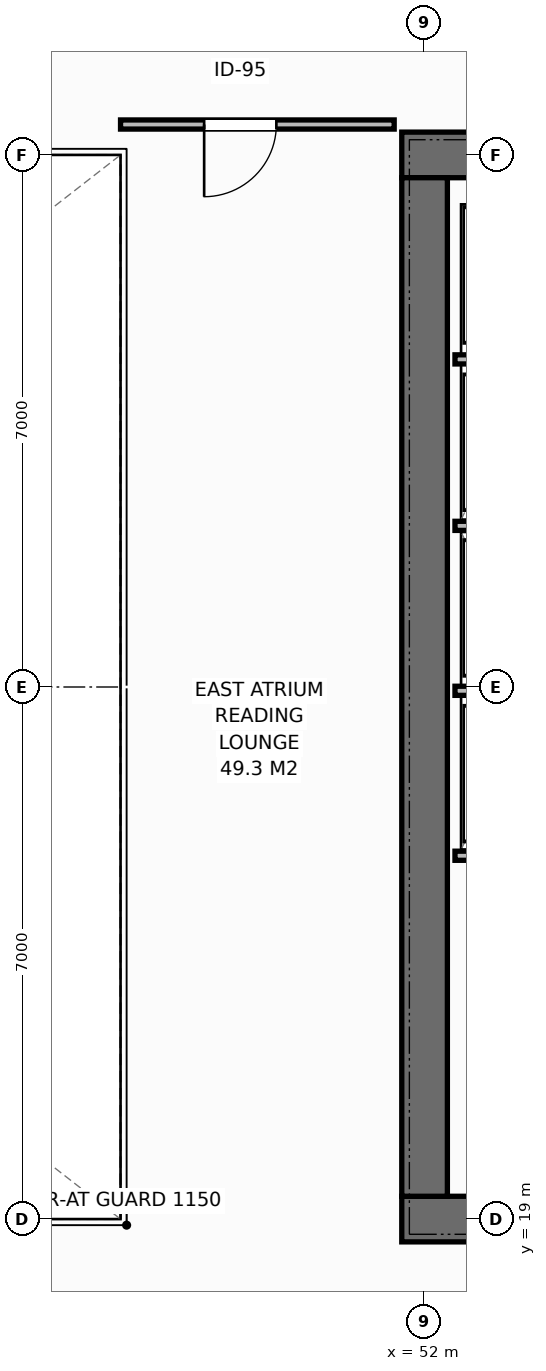
"""IFC4 building model, lengths in metres.
Left out: names, types, materials, properties, quantities, classifications, styles, units other than length and angle.
Written with IfcOpenShell. Run it as: python <this file> out.ifc"""

import sys

from ifc_helpers import new_model, si_unit, direction, frame, frame_2d, origin, place, context, subcontext, project, spatial, rectangle, extrude, element, fill, save


model = new_model("IFC4")
c1 = context("Model", 3, precision=1e-05, world=origin(), true_north=direction((0.0, 1.0)))
c2 = subcontext(c1, "Body", "Model", "MODEL_VIEW")
j1 = project(units=[si_unit("LENGTHUNIT", "METRE"), si_unit("PLANEANGLEUNIT", "RADIAN")], contexts=[c1])
p1 = place(None, origin())
s1 = spatial("IfcSite", under=j1, at=p1, CompositionType="ELEMENT")
p2 = place(p1, origin())
s2 = spatial("IfcBuilding", under=s1, at=p2, CompositionType="ELEMENT")
p3 = place(p2, frame((0.0, 0.0, 144.2)))
s3 = spatial("IfcBuildingStorey", under=s2, at=p3, CompositionType="ELEMENT", Elevation=144.2)
p4 = place(p3, frame((51.7, 19.0, 0.0), z_axis=(0.0, 0.0, 1.0), x_axis=(1.0, 0.0, 0.0)))
e1 = element("IfcWall", 1, at=p4, inside=s3, PredefinedType="SHEAR", context=c2, shape_type="SweptSolid", body=[
    extrude(rectangle(XDim=13.6, YDim=0.6, at=frame_2d((6.8, 0.0))), origin(), (0.0, 0.0, 1.0), 3.8),
])
p5 = place(p4, frame((3.02, 0.0, 0.0)))
e2 = element("IfcOpeningElement", 2, at=p5, cuts=e1, PredefinedType="OPENING", context=c2, shape_type="SweptSolid", body=[
    extrude(rectangle(XDim=1.4, YDim=2.2, at=frame_2d((0.7, 1.1))), frame((0.0, 0.31, 0.0), z_axis=(0.0, -1.0, 0.0), x_axis=(1.0, 0.0, 0.0)), (0.0, 0.0, 1.0), 0.62),
])
p6 = place(p3, frame((51.7, 33.0, 0.0), z_axis=(0.0, 0.0, 1.0), x_axis=(1.0, 0.0, 0.0)))
e3 = element("IfcWall", 3, at=p6, inside=s3, PredefinedType="SHEAR", context=c2, shape_type="SweptSolid", body=[
    extrude(rectangle(XDim=13.6, YDim=0.6, at=frame_2d((6.8, 0.0))), origin(), (0.0, 0.0, 1.0), 3.8),
])
p7 = place(p6, frame((3.02, 0.0, 0.0)))
e4 = element("IfcOpeningElement", 4, at=p7, cuts=e3, PredefinedType="OPENING", context=c2, shape_type="SweptSolid", body=[
    extrude(rectangle(XDim=1.4, YDim=2.2, at=frame_2d((0.7, 1.1))), frame((0.0, 0.31, 0.0), z_axis=(0.0, -1.0, 0.0), x_axis=(1.0, 0.0, 0.0)), (0.0, 0.0, 1.0), 0.62),
])
p8 = place(p6, frame((10.9, 0.0, 0.0)))
e5 = element("IfcOpeningElement", 5, at=p8, cuts=e3, PredefinedType="OPENING", context=c2, shape_type="SweptSolid", body=[
    extrude(rectangle(XDim=0.9, YDim=2.15, at=frame_2d((0.45, 1.075))), frame((0.0, 0.31, 0.0), z_axis=(0.0, -1.0, 0.0), x_axis=(1.0, 0.0, 0.0)), (0.0, 0.0, 1.0), 0.62),
])
p9 = place(p6, frame((5.65, 0.0, 0.0)))
e6 = element("IfcOpeningElement", 6, at=p9, cuts=e3, PredefinedType="OPENING", context=c2, shape_type="SweptSolid", body=[
    extrude(rectangle(XDim=0.9, YDim=2.15, at=frame_2d((0.45, 1.075))), frame((0.0, 0.31, 0.0), z_axis=(0.0, -1.0, 0.0), x_axis=(1.0, 0.0, 0.0)), (0.0, 0.0, 1.0), 0.62),
])
p10 = place(p6, frame((7.25, 0.0, 0.0)))
e7 = element("IfcOpeningElement", 7, at=p10, cuts=e3, PredefinedType="OPENING", context=c2, shape_type="SweptSolid", body=[
    extrude(rectangle(XDim=0.9, YDim=2.15, at=frame_2d((0.45, 1.075))), frame((0.0, 0.31, 0.0), z_axis=(0.0, -1.0, 0.0), x_axis=(1.0, 0.0, 0.0)), (0.0, 0.0, 1.0), 0.62),
])
p11 = place(p6, frame((8.85, 0.0, 0.0)))
e8 = element("IfcOpeningElement", 8, at=p11, cuts=e3, PredefinedType="OPENING", context=c2, shape_type="SweptSolid", body=[
    extrude(rectangle(XDim=0.9, YDim=2.15, at=frame_2d((0.45, 1.075))), frame((0.0, 0.31, 0.0), z_axis=(0.0, -1.0, 0.0), x_axis=(1.0, 0.0, 0.0)), (0.0, 0.0, 1.0), 0.62),
])
p12 = place(p3, frame((52.0, 19.3, 0.0), z_axis=(0.0, 0.0, 1.0), x_axis=(0.0, 1.0, 0.0)))
e9 = element("IfcWall", 9, at=p12, inside=s3, PredefinedType="SHEAR", context=c2, shape_type="SweptSolid", body=[
    extrude(rectangle(XDim=13.4, YDim=0.6, at=frame_2d((6.7, 0.0))), origin(), (0.0, 0.0, 1.0), 3.8),
])
for number, where, z_axis, x_axis in (
    (10, (52.4, 23.78, 0.0), (0.0, 0.0, 1.0), (1.0, 0.0, 0.0)),
    (11, (52.4, 25.95, 0.0), (0.0, 0.0, 1.0), (1.0, 0.0, 0.0)),
    (12, (52.4, 28.12, 0.0), (0.0, 0.0, 1.0), (1.0, 0.0, 0.0)),
    (13, (52.4, 30.31, 0.0), (0.0, 0.0, 1.0), (1.0, 0.0, 0.0)),
):
    element("IfcWall", number, at=place(p3, frame(where, z_axis=z_axis, x_axis=x_axis)), inside=s3, PredefinedType="PARTITIONING", context=c2, shape_type="SweptSolid", body=[
        extrude(rectangle(XDim=2.2, YDim=0.12, at=frame_2d((1.1, 0.0))), origin(), (0.0, 0.0, 1.0), 3.572),
    ])
p13 = place(p3, frame((48.0, 33.4, 0.0), z_axis=(0.0, 0.0, 1.0), x_axis=(1.0, 0.0, 0.0)))
e14 = element("IfcWall", 14, at=p13, inside=s3, PredefinedType="PARTITIONING", context=c2, shape_type="SweptSolid", body=[
    extrude(rectangle(XDim=3.6, YDim=0.12, at=frame_2d((1.8, 0.0))), origin(), (0.0, 0.0, 1.0), 3.572),
])
p14 = place(p13, frame((1.1, 0.0, 0.0)))
e15 = element("IfcOpeningElement", 15, at=p14, cuts=e14, PredefinedType="OPENING", context=c2, shape_type="SweptSolid", body=[
    extrude(rectangle(XDim=0.95, YDim=2.15, at=frame_2d((0.475, 1.075))), frame((0.0, 0.07, 0.0), z_axis=(0.0, -1.0, 0.0), x_axis=(1.0, 0.0, 0.0)), (0.0, 0.0, 1.0), 0.14),
])
p15 = place(p14, origin())
e16 = element("IfcDoor", 16, at=p15, inside=s3, OperationType="SINGLE_SWING_RIGHT", PredefinedType="DOOR", context=c2, shape_type="SweptSolid", body=[
    extrude(rectangle(XDim=0.95, YDim=2.15, at=frame_2d((0.475, 1.075))), frame((0.0, 0.025, 0.0), z_axis=(0.0, -1.0, 0.0), x_axis=(1.0, 0.0, 0.0)), (0.0, 0.0, 1.0), 0.05),
])
fill(e15, e16)
save(model, sys.argv[1])
